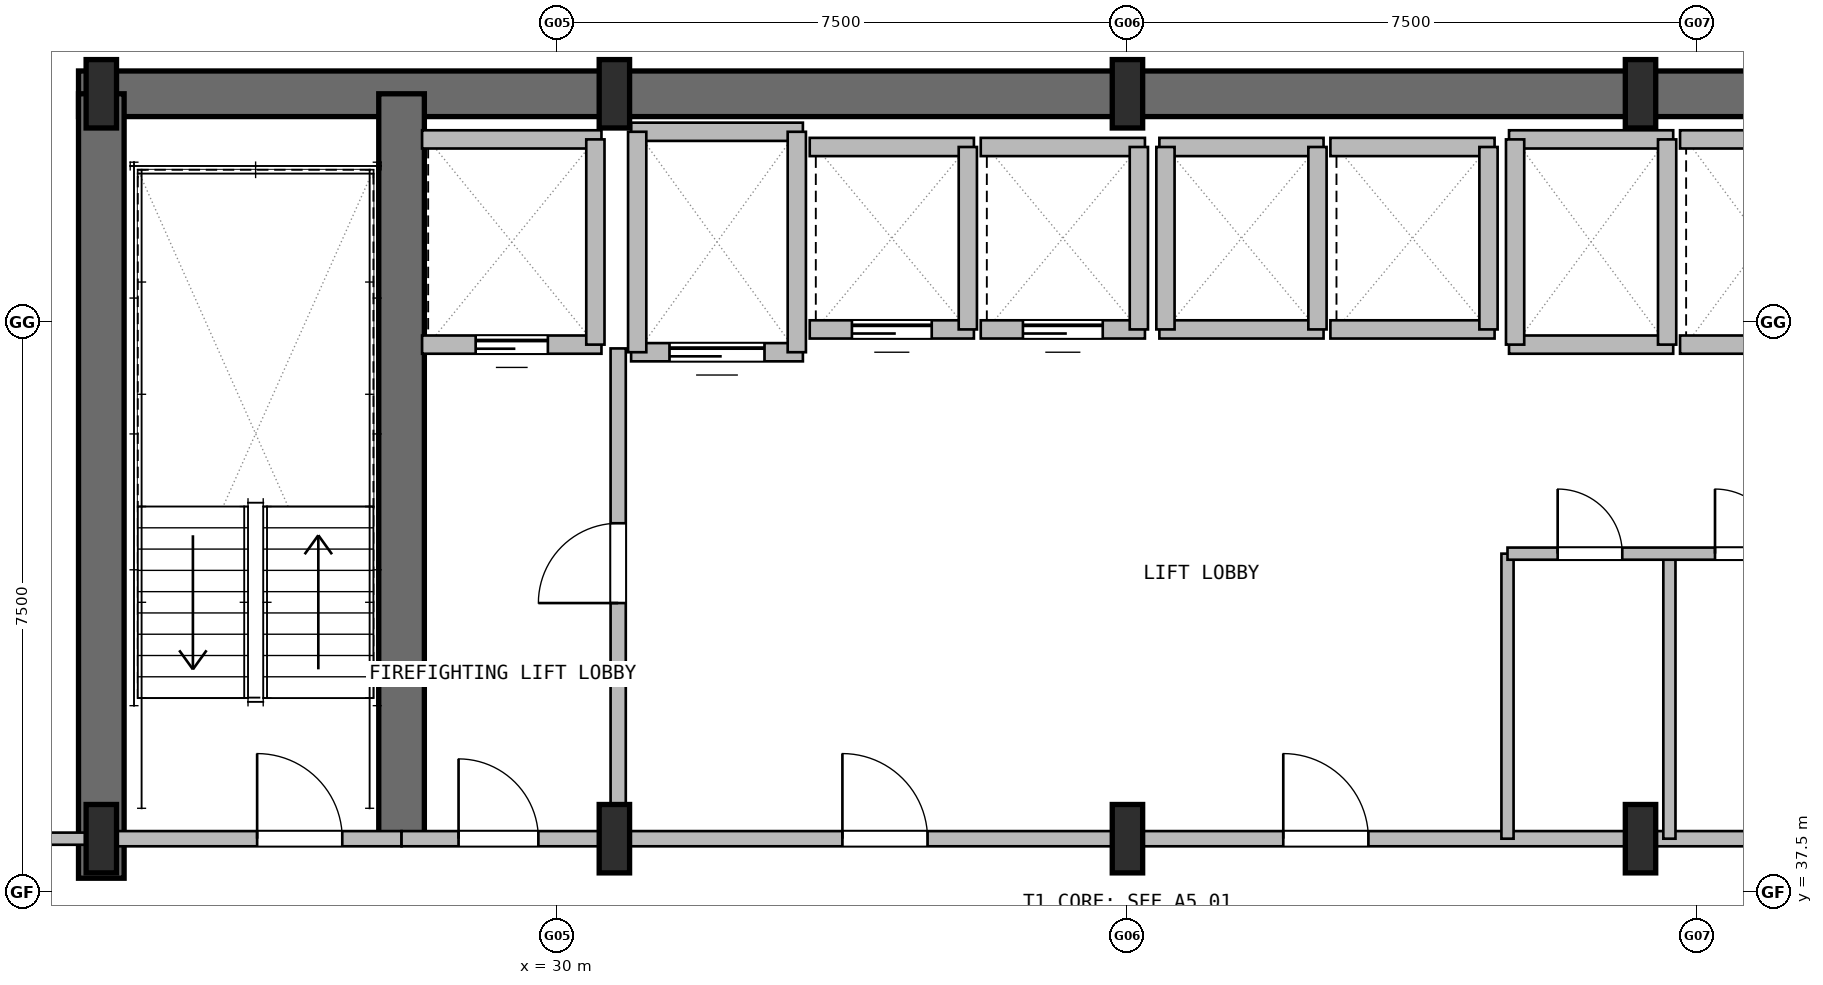
"""IFC4 building model, lengths in metres.
Left out: names, types, materials, properties, quantities, classifications, styles, units other than length and angle.
Written with IfcOpenShell. Run it as: python <this file> out.ifc"""

import sys

from ifc_helpers import new_model, si_unit, direction, frame, frame_2d, origin, origin_2d, place, context, subcontext, project, spatial, rectangle, i_section, extrude, element, fill, save


model = new_model("IFC4")
c1 = context("Model", 3, precision=1e-05, world=origin(), true_north=direction((0.0, 1.0)))
c2 = subcontext(c1, "Body", "Model", "MODEL_VIEW")
j1 = project(units=[si_unit("LENGTHUNIT", "METRE"), si_unit("PLANEANGLEUNIT", "RADIAN")], contexts=[c1])
p1 = place(None, origin())
s1 = spatial("IfcSite", under=j1, at=p1, CompositionType="ELEMENT")
p2 = place(p1, origin())
s2 = spatial("IfcBuilding", under=s1, at=p2, CompositionType="ELEMENT")
p3 = place(p2, frame((0.0, 0.0, 57.0)))
s3 = spatial("IfcBuildingStorey", under=s2, at=p3, CompositionType="ELEMENT", Elevation=57.0)
p4 = place(p3, frame((23.7, 48.0, 0.0), z_axis=(0.0, 0.0, 1.0), x_axis=(1.0, 0.0, 0.0)))
e1 = element("IfcWall", 1, at=p4, inside=s3, PredefinedType="SHEAR", context=c2, shape_type="SweptSolid", body=[
    extrude(rectangle(XDim=27.6, YDim=0.6, at=frame_2d((13.8, 0.0))), origin(), (0.0, 0.0, 1.0), 3.3),
])
p5 = place(p3, frame((24.0, 37.68, 0.0), z_axis=(0.0, 0.0, 1.0), x_axis=(0.0, 1.0, 0.0)))
e2 = element("IfcWall", 2, at=p5, inside=s3, PredefinedType="SHEAR", context=c2, shape_type="SweptSolid", body=[
    extrude(rectangle(XDim=10.32, YDim=0.6, at=frame_2d((5.16, 0.0))), origin(), (0.0, 0.0, 1.0), 3.3),
])
p6 = place(p3, frame((27.95, 38.2, 0.0), z_axis=(0.0, 0.0, 1.0), x_axis=(0.0, 1.0, 0.0)))
e3 = element("IfcWall", 3, at=p6, inside=s3, PredefinedType="SHEAR", context=c2, shape_type="SweptSolid", body=[
    extrude(rectangle(XDim=9.8, YDim=0.6, at=frame_2d((4.9, 0.0))), origin(), (0.0, 0.0, 1.0), 3.3),
])
for number, where, z_axis, x_axis in (
    (4, (24.0, 38.2, 0.0), (0.0, 0.0, 1.0), (1.0, 0.0, 0.0)),
    (5, (24.0, 48.0, 0.0), (0.0, 0.0, 1.0), (1.0, 0.0, 0.0)),
    (6, (30.75, 38.2, 0.0), (0.0, 0.0, 1.0), (1.0, 0.0, 0.0)),
    (7, (30.75, 48.0, 0.0), (0.0, 0.0, 1.0), (1.0, 0.0, 0.0)),
    (8, (37.5, 38.2, 0.0), (0.0, 0.0, 1.0), (1.0, 0.0, 0.0)),
    (9, (37.5, 48.0, 0.0), (0.0, 0.0, 1.0), (1.0, 0.0, 0.0)),
    (10, (44.25, 38.2, 0.0), (0.0, 0.0, 1.0), (1.0, 0.0, 0.0)),
    (11, (44.25, 48.0, 0.0), (0.0, 0.0, 1.0), (1.0, 0.0, 0.0)),
):
    element("IfcColumn", number, at=place(p3, frame(where, z_axis=z_axis, x_axis=x_axis)), inside=s3, PredefinedType="COLUMN", context=c2, shape_type="SweptSolid", body=[
        extrude(i_section(OverallWidth=0.4, OverallDepth=0.9, WebThickness=0.02, FlangeThickness=0.036, at=origin_2d()), origin(), (0.0, 0.0, 1.0), 3.3),
    ])
p7 = place(p3, frame((24.0, 38.2, 0.0), z_axis=(0.0, 0.0, 1.0), x_axis=(1.0, 0.0, 0.0)))
e12 = element("IfcWall", 12, at=p7, inside=s3, PredefinedType="PARTITIONING", context=c2, shape_type="SweptSolid", body=[
    extrude(rectangle(XDim=3.95, YDim=0.2, at=frame_2d((1.975, 0.0))), origin(), (0.0, 0.0, 1.0), 2.33),
])
p8 = place(p7, frame((2.05, 0.0, 0.0)))
e13 = element("IfcOpeningElement", 13, at=p8, cuts=e12, PredefinedType="OPENING", context=c2, shape_type="SweptSolid", body=[
    extrude(rectangle(XDim=1.12, YDim=2.1, at=frame_2d((0.56, 1.05))), frame((0.0, 0.11, 0.0), z_axis=(0.0, -1.0, 0.0), x_axis=(1.0, 0.0, 0.0)), (0.0, 0.0, 1.0), 0.22),
])
p9 = place(p3, frame((30.8, 38.2, 0.0), z_axis=(0.0, 0.0, 1.0), x_axis=(0.0, 1.0, 0.0)))
e14 = element("IfcWall", 14, at=p9, inside=s3, PredefinedType="PARTITIONING", context=c2, shape_type="SweptSolid", body=[
    extrude(rectangle(XDim=6.45, YDim=0.2, at=frame_2d((3.225, 0.0))), origin(), (0.0, 0.0, 1.0), 2.33),
])
p10 = place(p9, frame((3.1, 0.0, 0.0)))
e15 = element("IfcOpeningElement", 15, at=p10, cuts=e14, PredefinedType="OPENING", context=c2, shape_type="SweptSolid", body=[
    extrude(rectangle(XDim=1.05, YDim=2.1, at=frame_2d((0.525, 1.05))), frame((0.0, 0.11, 0.0), z_axis=(0.0, -1.0, 0.0), x_axis=(1.0, 0.0, 0.0)), (0.0, 0.0, 1.0), 0.22),
])
p11 = place(p3, frame((27.95, 38.2, 0.0), z_axis=(0.0, 0.0, 1.0), x_axis=(1.0, 0.0, 0.0)))
e16 = element("IfcWall", 16, at=p11, inside=s3, PredefinedType="PARTITIONING", context=c2, shape_type="SweptSolid", body=[
    extrude(rectangle(XDim=2.85, YDim=0.2, at=frame_2d((1.425, 0.0))), origin(), (0.0, 0.0, 1.0), 2.33),
])
p12 = place(p11, frame((0.75, 0.0, 0.0)))
e17 = element("IfcOpeningElement", 17, at=p12, cuts=e16, PredefinedType="OPENING", context=c2, shape_type="SweptSolid", body=[
    extrude(rectangle(XDim=1.05, YDim=2.1, at=frame_2d((0.525, 1.05))), frame((0.0, 0.11, 0.0), z_axis=(0.0, -1.0, 0.0), x_axis=(1.0, 0.0, 0.0)), (0.0, 0.0, 1.0), 0.22),
])
p13 = place(p3, frame((30.8, 38.2, 0.0), z_axis=(0.0, 0.0, 1.0), x_axis=(1.0, 0.0, 0.0)))
e18 = element("IfcWall", 18, at=p13, inside=s3, PredefinedType="PARTITIONING", context=c2, shape_type="SweptSolid", body=[
    extrude(rectangle(XDim=16.35, YDim=0.2, at=frame_2d((8.175, 0.0))), origin(), (0.0, 0.0, 1.0), 2.33),
])
p14 = place(p13, frame((2.95, 0.0, 0.0)))
e19 = element("IfcOpeningElement", 19, at=p14, cuts=e18, PredefinedType="OPENING", context=c2, shape_type="SweptSolid", body=[
    extrude(rectangle(XDim=1.12, YDim=2.1, at=frame_2d((0.56, 1.05))), frame((0.0, 0.11, 0.0), z_axis=(0.0, -1.0, 0.0), x_axis=(1.0, 0.0, 0.0)), (0.0, 0.0, 1.0), 0.22),
])
p15 = place(p13, frame((8.75, 0.0, 0.0)))
e20 = element("IfcOpeningElement", 20, at=p15, cuts=e18, PredefinedType="OPENING", context=c2, shape_type="SweptSolid", body=[
    extrude(rectangle(XDim=1.12, YDim=2.1, at=frame_2d((0.56, 1.05))), frame((0.0, 0.11, 0.0), z_axis=(0.0, -1.0, 0.0), x_axis=(1.0, 0.0, 0.0)), (0.0, 0.0, 1.0), 0.22),
])
p16 = place(p3, frame((28.22, 44.7, 0.0), z_axis=(0.0, 0.0, 1.0), x_axis=(1.0, 0.0, 0.0)))
e21 = element("IfcWall", 21, at=p16, inside=s3, PredefinedType="PARTITIONING", context=c2, shape_type="SweptSolid", body=[
    extrude(rectangle(XDim=2.36, YDim=0.24, at=frame_2d((1.18, 0.0))), origin(), (0.0, 0.0, 1.0), 3.03),
])
p17 = place(p16, frame((0.705, 0.0, 0.0)))
e22 = element("IfcOpeningElement", 22, at=p17, cuts=e21, PredefinedType="OPENING", context=c2, shape_type="SweptSolid", body=[
    extrude(rectangle(XDim=0.95, YDim=2.15, at=frame_2d((0.475, 1.075))), frame((0.0, 0.13, 0.0), z_axis=(0.0, -1.0, 0.0), x_axis=(1.0, 0.0, 0.0)), (0.0, 0.0, 1.0), 0.26),
])
p18 = place(p3, frame((28.22, 47.4, 0.0), z_axis=(0.0, 0.0, 1.0), x_axis=(1.0, 0.0, 0.0)))
e23 = element("IfcWall", 23, at=p18, inside=s3, PredefinedType="PARTITIONING", context=c2, shape_type="SweptSolid", body=[
    extrude(rectangle(XDim=2.36, YDim=0.24, at=frame_2d((1.18, 0.0))), origin(), (0.0, 0.0, 1.0), 3.03),
])
p19 = place(p3, frame((30.5, 44.7, 0.0), z_axis=(0.0, 0.0, 1.0), x_axis=(0.0, 1.0, 0.0)))
e24 = element("IfcWall", 24, at=p19, inside=s3, PredefinedType="PARTITIONING", context=c2, shape_type="SweptSolid", body=[
    extrude(rectangle(XDim=2.7, YDim=0.24, at=frame_2d((1.35, 0.0))), origin(), (0.0, 0.0, 1.0), 2.33),
])
p20 = place(p3, frame((30.97, 44.6, 0.0), z_axis=(0.0, 0.0, 1.0), x_axis=(1.0, 0.0, 0.0)))
e25 = element("IfcWall", 25, at=p20, inside=s3, PredefinedType="PARTITIONING", context=c2, shape_type="SweptSolid", body=[
    extrude(rectangle(XDim=2.26, YDim=0.24, at=frame_2d((1.13, 0.0))), origin(), (0.0, 0.0, 1.0), 3.03),
])
p21 = place(p20, frame((0.505, 0.0, 0.0)))
e26 = element("IfcOpeningElement", 26, at=p21, cuts=e25, PredefinedType="OPENING", context=c2, shape_type="SweptSolid", body=[
    extrude(rectangle(XDim=1.25, YDim=2.2, at=frame_2d((0.625, 1.1))), frame((0.0, 0.13, 0.0), z_axis=(0.0, -1.0, 0.0), x_axis=(1.0, 0.0, 0.0)), (0.0, 0.0, 1.0), 0.26),
])
p22 = place(p3, frame((30.97, 47.5, 0.0), z_axis=(0.0, 0.0, 1.0), x_axis=(1.0, 0.0, 0.0)))
e27 = element("IfcWall", 27, at=p22, inside=s3, PredefinedType="PARTITIONING", context=c2, shape_type="SweptSolid", body=[
    extrude(rectangle(XDim=2.26, YDim=0.24, at=frame_2d((1.13, 0.0))), origin(), (0.0, 0.0, 1.0), 3.03),
])
for number, where, z_axis, x_axis in (
    (28, (31.05, 44.6, 0.0), (0.0, 0.0, 1.0), (0.0, 1.0, 0.0)),
    (29, (33.15, 44.6, 0.0), (0.0, 0.0, 1.0), (0.0, 1.0, 0.0)),
):
    element("IfcWall", number, at=place(p3, frame(where, z_axis=z_axis, x_axis=x_axis)), inside=s3, PredefinedType="PARTITIONING", context=c2, shape_type="SweptSolid", body=[
        extrude(rectangle(XDim=2.9, YDim=0.24, at=frame_2d((1.45, 0.0))), origin(), (0.0, 0.0, 1.0), 3.03),
    ])
p23 = place(p3, frame((33.32, 44.9, 0.0), z_axis=(0.0, 0.0, 1.0), x_axis=(1.0, 0.0, 0.0)))
e30 = element("IfcWall", 30, at=p23, inside=s3, PredefinedType="PARTITIONING", context=c2, shape_type="SweptSolid", body=[
    extrude(rectangle(XDim=2.16, YDim=0.24, at=frame_2d((1.08, 0.0))), origin(), (0.0, 0.0, 1.0), 3.03),
])
p24 = place(p23, frame((0.555, 0.0, 0.0)))
e31 = element("IfcOpeningElement", 31, at=p24, cuts=e30, PredefinedType="OPENING", context=c2, shape_type="SweptSolid", body=[
    extrude(rectangle(XDim=1.05, YDim=2.15, at=frame_2d((0.525, 1.075))), frame((0.0, 0.13, 0.0), z_axis=(0.0, -1.0, 0.0), x_axis=(1.0, 0.0, 0.0)), (0.0, 0.0, 1.0), 0.26),
])
p25 = place(p3, frame((33.32, 47.3, 0.0), z_axis=(0.0, 0.0, 1.0), x_axis=(1.0, 0.0, 0.0)))
e32 = element("IfcWall", 32, at=p25, inside=s3, PredefinedType="PARTITIONING", context=c2, shape_type="SweptSolid", body=[
    extrude(rectangle(XDim=2.16, YDim=0.24, at=frame_2d((1.08, 0.0))), origin(), (0.0, 0.0, 1.0), 3.03),
])
p26 = place(p3, frame((35.4, 44.9, 0.0), z_axis=(0.0, 0.0, 1.0), x_axis=(0.0, 1.0, 0.0)))
e33 = element("IfcWall", 33, at=p26, inside=s3, PredefinedType="PARTITIONING", context=c2, shape_type="SweptSolid", body=[
    extrude(rectangle(XDim=2.4, YDim=0.24, at=frame_2d((1.2, 0.0))), origin(), (0.0, 0.0, 1.0), 3.03),
])
p27 = place(p3, frame((35.57, 44.9, 0.0), z_axis=(0.0, 0.0, 1.0), x_axis=(1.0, 0.0, 0.0)))
e34 = element("IfcWall", 34, at=p27, inside=s3, PredefinedType="PARTITIONING", context=c2, shape_type="SweptSolid", body=[
    extrude(rectangle(XDim=2.16, YDim=0.24, at=frame_2d((1.08, 0.0))), origin(), (0.0, 0.0, 1.0), 3.03),
])
p28 = place(p27, frame((0.555, 0.0, 0.0)))
e35 = element("IfcOpeningElement", 35, at=p28, cuts=e34, PredefinedType="OPENING", context=c2, shape_type="SweptSolid", body=[
    extrude(rectangle(XDim=1.05, YDim=2.15, at=frame_2d((0.525, 1.075))), frame((0.0, 0.13, 0.0), z_axis=(0.0, -1.0, 0.0), x_axis=(1.0, 0.0, 0.0)), (0.0, 0.0, 1.0), 0.26),
])
p29 = place(p3, frame((35.57, 47.3, 0.0), z_axis=(0.0, 0.0, 1.0), x_axis=(1.0, 0.0, 0.0)))
e36 = element("IfcWall", 36, at=p29, inside=s3, PredefinedType="PARTITIONING", context=c2, shape_type="SweptSolid", body=[
    extrude(rectangle(XDim=2.16, YDim=0.24, at=frame_2d((1.08, 0.0))), origin(), (0.0, 0.0, 1.0), 3.03),
])
p30 = place(p3, frame((37.65, 44.9, 0.0), z_axis=(0.0, 0.0, 1.0), x_axis=(0.0, 1.0, 0.0)))
e37 = element("IfcWall", 37, at=p30, inside=s3, PredefinedType="PARTITIONING", context=c2, shape_type="SweptSolid", body=[
    extrude(rectangle(XDim=2.4, YDim=0.24, at=frame_2d((1.2, 0.0))), origin(), (0.0, 0.0, 1.0), 3.03),
])
for number, where, z_axis, x_axis in (
    (38, (37.92, 44.9, 0.0), (0.0, 0.0, 1.0), (1.0, 0.0, 0.0)),
    (39, (37.92, 47.3, 0.0), (0.0, 0.0, 1.0), (1.0, 0.0, 0.0)),
):
    element("IfcWall", number, at=place(p3, frame(where, z_axis=z_axis, x_axis=x_axis)), inside=s3, PredefinedType="PARTITIONING", context=c2, shape_type="SweptSolid", body=[
        extrude(rectangle(XDim=2.16, YDim=0.24, at=frame_2d((1.08, 0.0))), origin(), (0.0, 0.0, 1.0), 3.03),
    ])
for number, where, z_axis, x_axis in (
    (40, (38.0, 44.9, 0.0), (0.0, 0.0, 1.0), (0.0, 1.0, 0.0)),
    (41, (40.0, 44.9, 0.0), (0.0, 0.0, 1.0), (0.0, 1.0, 0.0)),
):
    element("IfcWall", number, at=place(p3, frame(where, z_axis=z_axis, x_axis=x_axis)), inside=s3, PredefinedType="PARTITIONING", context=c2, shape_type="SweptSolid", body=[
        extrude(rectangle(XDim=2.4, YDim=0.24, at=frame_2d((1.2, 0.0))), origin(), (0.0, 0.0, 1.0), 3.03),
    ])
for number, where, z_axis, x_axis in (
    (42, (40.17, 44.9, 0.0), (0.0, 0.0, 1.0), (1.0, 0.0, 0.0)),
    (43, (40.17, 47.3, 0.0), (0.0, 0.0, 1.0), (1.0, 0.0, 0.0)),
):
    element("IfcWall", number, at=place(p3, frame(where, z_axis=z_axis, x_axis=x_axis)), inside=s3, PredefinedType="PARTITIONING", context=c2, shape_type="SweptSolid", body=[
        extrude(rectangle(XDim=2.16, YDim=0.24, at=frame_2d((1.08, 0.0))), origin(), (0.0, 0.0, 1.0), 3.03),
    ])
p31 = place(p3, frame((42.25, 44.9, 0.0), z_axis=(0.0, 0.0, 1.0), x_axis=(0.0, 1.0, 0.0)))
e44 = element("IfcWall", 44, at=p31, inside=s3, PredefinedType="PARTITIONING", context=c2, shape_type="SweptSolid", body=[
    extrude(rectangle(XDim=2.4, YDim=0.24, at=frame_2d((1.2, 0.0))), origin(), (0.0, 0.0, 1.0), 3.03),
])
for number, where, z_axis, x_axis in (
    (45, (42.52, 44.7, 0.0), (0.0, 0.0, 1.0), (1.0, 0.0, 0.0)),
    (46, (42.52, 47.4, 0.0), (0.0, 0.0, 1.0), (1.0, 0.0, 0.0)),
):
    element("IfcWall", number, at=place(p3, frame(where, z_axis=z_axis, x_axis=x_axis)), inside=s3, PredefinedType="PARTITIONING", context=c2, shape_type="SweptSolid", body=[
        extrude(rectangle(XDim=2.16, YDim=0.24, at=frame_2d((1.08, 0.0))), origin(), (0.0, 0.0, 1.0), 3.03),
    ])
for number, where, z_axis, x_axis in (
    (47, (42.6, 44.7, 0.0), (0.0, 0.0, 1.0), (0.0, 1.0, 0.0)),
    (48, (44.6, 44.7, 0.0), (0.0, 0.0, 1.0), (0.0, 1.0, 0.0)),
):
    element("IfcWall", number, at=place(p3, frame(where, z_axis=z_axis, x_axis=x_axis)), inside=s3, PredefinedType="PARTITIONING", context=c2, shape_type="SweptSolid", body=[
        extrude(rectangle(XDim=2.7, YDim=0.24, at=frame_2d((1.35, 0.0))), origin(), (0.0, 0.0, 1.0), 3.03),
    ])
for number, where, z_axis, x_axis in (
    (49, (44.77, 44.7, 0.0), (0.0, 0.0, 1.0), (1.0, 0.0, 0.0)),
    (50, (44.77, 47.4, 0.0), (0.0, 0.0, 1.0), (1.0, 0.0, 0.0)),
):
    element("IfcWall", number, at=place(p3, frame(where, z_axis=z_axis, x_axis=x_axis)), inside=s3, PredefinedType="PARTITIONING", context=c2, shape_type="SweptSolid", body=[
        extrude(rectangle(XDim=2.16, YDim=0.24, at=frame_2d((1.08, 0.0))), origin(), (0.0, 0.0, 1.0), 3.03),
    ])
for number, where, z_axis, x_axis in (
    (51, (42.5, 38.2, 0.0), (0.0, 0.0, 1.0), (0.0, 1.0, 0.0)),
    (52, (44.63, 38.2, 0.0), (0.0, 0.0, 1.0), (0.0, 1.0, 0.0)),
):
    element("IfcWall", number, at=place(p3, frame(where, z_axis=z_axis, x_axis=x_axis)), inside=s3, PredefinedType="PARTITIONING", context=c2, shape_type="SweptSolid", body=[
        extrude(rectangle(XDim=3.75, YDim=0.16, at=frame_2d((1.875, 0.0))), origin(), (0.0, 0.0, 1.0), 3.03),
    ])
p32 = place(p3, frame((42.5, 41.95, 0.0), z_axis=(0.0, 0.0, 1.0), x_axis=(1.0, 0.0, 0.0)))
e53 = element("IfcWall", 53, at=p32, inside=s3, PredefinedType="PARTITIONING", context=c2, shape_type="SweptSolid", body=[
    extrude(rectangle(XDim=4.65, YDim=0.16, at=frame_2d((2.325, 0.0))), origin(), (0.0, 0.0, 1.0), 3.03),
])
p33 = place(p32, frame((0.66, 0.0, 0.0)))
e54 = element("IfcOpeningElement", 54, at=p33, cuts=e53, PredefinedType="OPENING", context=c2, shape_type="SweptSolid", body=[
    extrude(rectangle(XDim=0.85, YDim=2.05, at=frame_2d((0.425, 1.025))), frame((0.0, 0.09, 0.0), z_axis=(0.0, -1.0, 0.0), x_axis=(1.0, 0.0, 0.0)), (0.0, 0.0, 1.0), 0.18),
])
p34 = place(p32, frame((2.73, 0.0, 0.0)))
e55 = element("IfcOpeningElement", 55, at=p34, cuts=e53, PredefinedType="OPENING", context=c2, shape_type="SweptSolid", body=[
    extrude(rectangle(XDim=0.85, YDim=2.05, at=frame_2d((0.425, 1.025))), frame((0.0, 0.09, 0.0), z_axis=(0.0, -1.0, 0.0), x_axis=(1.0, 0.0, 0.0)), (0.0, 0.0, 1.0), 0.18),
])
p35 = place(p3, frame((16.35, 38.2, 0.0), z_axis=(0.0, 0.0, 1.0), x_axis=(1.0, 0.0, 0.0)))
e56 = element("IfcWall", 56, at=p35, inside=s3, PredefinedType="PARTITIONING", context=c2, shape_type="SweptSolid", body=[
    extrude(rectangle(XDim=7.65, YDim=0.16, at=frame_2d((3.825, 0.0))), origin(), (0.0, 0.0, 1.0), 2.33),
])
p36 = place(p8, origin())
e57 = element("IfcDoor", 57, at=p36, inside=s3, OperationType="SINGLE_SWING_LEFT", PredefinedType="DOOR", context=c2, shape_type="SweptSolid", body=[
    extrude(rectangle(XDim=1.12, YDim=2.1, at=frame_2d((0.56, 1.05))), frame((0.0, 0.025, 0.0), z_axis=(0.0, -1.0, 0.0), x_axis=(1.0, 0.0, 0.0)), (0.0, 0.0, 1.0), 0.05),
])
fill(e13, e57)
p37 = place(p10, origin())
e58 = element("IfcDoor", 58, at=p37, inside=s3, OperationType="SINGLE_SWING_LEFT", PredefinedType="DOOR", context=c2, shape_type="SweptSolid", body=[
    extrude(rectangle(XDim=1.05, YDim=2.1, at=frame_2d((0.525, 1.05))), frame((0.0, 0.025, 0.0), z_axis=(0.0, -1.0, 0.0), x_axis=(1.0, 0.0, 0.0)), (0.0, 0.0, 1.0), 0.05),
])
fill(e15, e58)
p38 = place(p12, origin())
e59 = element("IfcDoor", 59, at=p38, inside=s3, OperationType="SINGLE_SWING_RIGHT", PredefinedType="DOOR", context=c2, shape_type="SweptSolid", body=[
    extrude(rectangle(XDim=1.05, YDim=2.1, at=frame_2d((0.525, 1.05))), frame((0.0, 0.025, 0.0), z_axis=(0.0, -1.0, 0.0), x_axis=(1.0, 0.0, 0.0)), (0.0, 0.0, 1.0), 0.05),
])
fill(e17, e59)
p39 = place(p14, origin())
e60 = element("IfcDoor", 60, at=p39, inside=s3, OperationType="SINGLE_SWING_LEFT", PredefinedType="DOOR", context=c2, shape_type="SweptSolid", body=[
    extrude(rectangle(XDim=1.12, YDim=2.1, at=frame_2d((0.56, 1.05))), frame((0.0, 0.025, 0.0), z_axis=(0.0, -1.0, 0.0), x_axis=(1.0, 0.0, 0.0)), (0.0, 0.0, 1.0), 0.05),
])
fill(e19, e60)
p40 = place(p15, origin())
e61 = element("IfcDoor", 61, at=p40, inside=s3, OperationType="SINGLE_SWING_RIGHT", PredefinedType="DOOR", context=c2, shape_type="SweptSolid", body=[
    extrude(rectangle(XDim=1.12, YDim=2.1, at=frame_2d((0.56, 1.05))), frame((0.0, 0.025, 0.0), z_axis=(0.0, -1.0, 0.0), x_axis=(1.0, 0.0, 0.0)), (0.0, 0.0, 1.0), 0.05),
])
fill(e20, e61)
p41 = place(p17, origin())
e62 = element("IfcDoor", 62, at=p41, inside=s3, OperationType="SLIDING_TO_LEFT", PredefinedType="DOOR", context=c2, shape_type="SweptSolid", body=[
    extrude(rectangle(XDim=0.95, YDim=2.15, at=frame_2d((0.475, 1.075))), frame((0.0, 0.025, 0.0), z_axis=(0.0, -1.0, 0.0), x_axis=(1.0, 0.0, 0.0)), (0.0, 0.0, 1.0), 0.05),
])
fill(e22, e62)
p42 = place(p21, origin())
e63 = element("IfcDoor", 63, at=p42, inside=s3, OperationType="SLIDING_TO_LEFT", PredefinedType="DOOR", context=c2, shape_type="SweptSolid", body=[
    extrude(rectangle(XDim=1.25, YDim=2.2, at=frame_2d((0.625, 1.1))), frame((0.0, 0.025, 0.0), z_axis=(0.0, -1.0, 0.0), x_axis=(1.0, 0.0, 0.0)), (0.0, 0.0, 1.0), 0.05),
])
fill(e26, e63)
p43 = place(p24, origin())
e64 = element("IfcDoor", 64, at=p43, inside=s3, OperationType="SLIDING_TO_LEFT", PredefinedType="DOOR", context=c2, shape_type="SweptSolid", body=[
    extrude(rectangle(XDim=1.05, YDim=2.15, at=frame_2d((0.525, 1.075))), frame((0.0, 0.025, 0.0), z_axis=(0.0, -1.0, 0.0), x_axis=(1.0, 0.0, 0.0)), (0.0, 0.0, 1.0), 0.05),
])
fill(e31, e64)
p44 = place(p28, origin())
e65 = element("IfcDoor", 65, at=p44, inside=s3, OperationType="SLIDING_TO_LEFT", PredefinedType="DOOR", context=c2, shape_type="SweptSolid", body=[
    extrude(rectangle(XDim=1.05, YDim=2.15, at=frame_2d((0.525, 1.075))), frame((0.0, 0.025, 0.0), z_axis=(0.0, -1.0, 0.0), x_axis=(1.0, 0.0, 0.0)), (0.0, 0.0, 1.0), 0.05),
])
fill(e35, e65)
p45 = place(p33, origin())
e66 = element("IfcDoor", 66, at=p45, inside=s3, OperationType="SINGLE_SWING_RIGHT", PredefinedType="DOOR", context=c2, shape_type="SweptSolid", body=[
    extrude(rectangle(XDim=0.85, YDim=2.05, at=frame_2d((0.425, 1.025))), frame((0.0, 0.025, 0.0), z_axis=(0.0, -1.0, 0.0), x_axis=(1.0, 0.0, 0.0)), (0.0, 0.0, 1.0), 0.05),
])
fill(e54, e66)
p46 = place(p34, origin())
e67 = element("IfcDoor", 67, at=p46, inside=s3, OperationType="SINGLE_SWING_LEFT", PredefinedType="DOOR", context=c2, shape_type="SweptSolid", body=[
    extrude(rectangle(XDim=0.85, YDim=2.05, at=frame_2d((0.425, 1.025))), frame((0.0, 0.025, 0.0), z_axis=(0.0, -1.0, 0.0), x_axis=(1.0, 0.0, 0.0)), (0.0, 0.0, 1.0), 0.05),
])
fill(e55, e67)
save(model, sys.argv[1])
